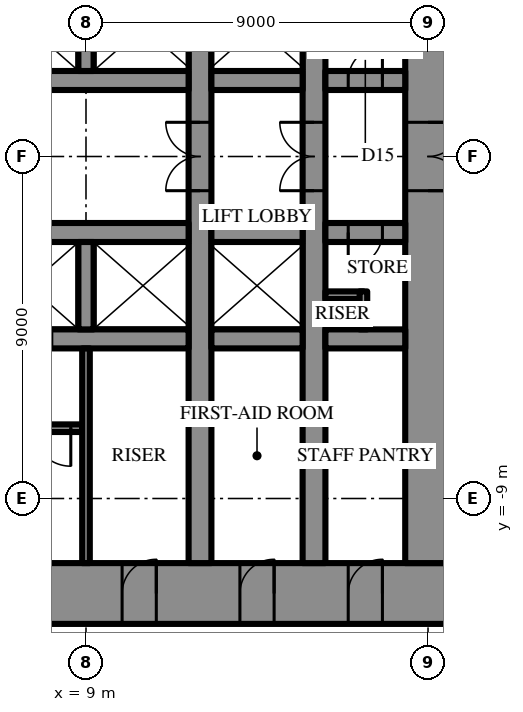
"""IFC4 building model, lengths in metres.
Left out: names, types, materials, properties, quantities, classifications, styles, units other than length and angle.
Written with IfcOpenShell. Run it as: python <this file> out.ifc"""

import sys

from ifc_helpers import new_model, si_unit, direction, frame, frame_2d, origin, place, context, subcontext, project, spatial, rectangle, extrude, element, fill, save


model = new_model("IFC4")
c1 = context("Model", 3, precision=1e-05, world=origin(), true_north=direction((0.0, 1.0)))
c2 = subcontext(c1, "Body", "Model", "MODEL_VIEW")
j1 = project(units=[si_unit("LENGTHUNIT", "METRE"), si_unit("PLANEANGLEUNIT", "RADIAN")], contexts=[c1])
p1 = place(None, origin())
s1 = spatial("IfcSite", under=j1, at=p1, CompositionType="ELEMENT")
p2 = place(p1, origin())
s2 = spatial("IfcBuilding", under=s1, at=p2, CompositionType="ELEMENT")
p3 = place(p2, frame((0.0, 0.0, 190.9)))
s3 = spatial("IfcBuildingStorey", under=s2, at=p3, CompositionType="ELEMENT", Elevation=190.9)
p4 = place(p3, frame((18.6, -11.5, 0.0), z_axis=(0.0, 0.0, 1.0), x_axis=(-1.0, 0.0, 0.0)))
e1 = element("IfcWall", 1, at=p4, inside=s3, PredefinedType="SHEAR", context=c2, shape_type="SweptSolid", body=[
    extrude(rectangle(XDim=37.2, YDim=1.6, at=frame_2d((18.6, 0.0))), origin(), (0.0, 0.0, 1.0), 4.2),
])
p5 = place(p4, frame((19.45, 0.0, 0.0)))
e2 = element("IfcOpeningElement", 2, at=p5, cuts=e1, PredefinedType="OPENING", context=c2, shape_type="SweptSolid", body=[
    extrude(rectangle(XDim=0.9, YDim=2.2, at=frame_2d((0.45, 1.1))), frame((0.0, 0.81, 0.0), z_axis=(0.0, -1.0, 0.0), x_axis=(1.0, 0.0, 0.0)), (0.0, 0.0, 1.0), 1.62),
])
p6 = place(p4, frame((22.45, 0.0, 0.0)))
e3 = element("IfcOpeningElement", 3, at=p6, cuts=e1, PredefinedType="OPENING", context=c2, shape_type="SweptSolid", body=[
    extrude(rectangle(XDim=0.9, YDim=2.2, at=frame_2d((0.45, 1.1))), frame((0.0, 0.81, 0.0), z_axis=(0.0, -1.0, 0.0), x_axis=(1.0, 0.0, 0.0)), (0.0, 0.0, 1.0), 1.62),
])
p7 = place(p4, frame((25.5, 0.0, 0.0)))
e4 = element("IfcOpeningElement", 4, at=p7, cuts=e1, PredefinedType="OPENING", context=c2, shape_type="SweptSolid", body=[
    extrude(rectangle(XDim=1.0, YDim=2.2, at=frame_2d((0.5, 1.1))), frame((0.0, 0.81, 0.0), z_axis=(0.0, -1.0, 0.0), x_axis=(1.0, 0.0, 0.0)), (0.0, 0.0, 1.0), 1.62),
])
p8 = place(p4, frame((1.8, 0.0, 0.0)))
e5 = element("IfcOpeningElement", 5, at=p8, cuts=e1, PredefinedType="OPENING", context=c2, shape_type="SweptSolid", body=[
    extrude(rectangle(XDim=0.9, YDim=2.2, at=frame_2d((0.45, 1.1))), frame((0.0, 0.81, 0.0), z_axis=(0.0, -1.0, 0.0), x_axis=(1.0, 0.0, 0.0)), (0.0, 0.0, 1.0), 1.62),
])
p9 = place(p4, frame((4.65, 0.0, 0.0)))
e6 = element("IfcOpeningElement", 6, at=p9, cuts=e1, PredefinedType="OPENING", context=c2, shape_type="SweptSolid", body=[
    extrude(rectangle(XDim=0.9, YDim=2.2, at=frame_2d((0.45, 1.1))), frame((0.0, 0.81, 0.0), z_axis=(0.0, -1.0, 0.0), x_axis=(1.0, 0.0, 0.0)), (0.0, 0.0, 1.0), 1.62),
])
p10 = place(p4, frame((7.75, 0.0, 0.0)))
e7 = element("IfcOpeningElement", 7, at=p10, cuts=e1, PredefinedType="OPENING", context=c2, shape_type="SweptSolid", body=[
    extrude(rectangle(XDim=0.9, YDim=2.2, at=frame_2d((0.45, 1.1))), frame((0.0, 0.81, 0.0), z_axis=(0.0, -1.0, 0.0), x_axis=(1.0, 0.0, 0.0)), (0.0, 0.0, 1.0), 1.62),
])
p11 = place(p4, frame((28.55, 0.0, 0.0)))
e8 = element("IfcOpeningElement", 8, at=p11, cuts=e1, PredefinedType="OPENING", context=c2, shape_type="SweptSolid", body=[
    extrude(rectangle(XDim=0.9, YDim=2.2, at=frame_2d((0.45, 1.1))), frame((0.0, 0.81, 0.0), z_axis=(0.0, -1.0, 0.0), x_axis=(1.0, 0.0, 0.0)), (0.0, 0.0, 1.0), 1.62),
])
p12 = place(p4, frame((31.65, 0.0, 0.0)))
e9 = element("IfcOpeningElement", 9, at=p12, cuts=e1, PredefinedType="OPENING", context=c2, shape_type="SweptSolid", body=[
    extrude(rectangle(XDim=0.9, YDim=2.2, at=frame_2d((0.45, 1.1))), frame((0.0, 0.81, 0.0), z_axis=(0.0, -1.0, 0.0), x_axis=(1.0, 0.0, 0.0)), (0.0, 0.0, 1.0), 1.62),
])
p13 = place(p4, frame((34.5, 0.0, 0.0)))
e10 = element("IfcOpeningElement", 10, at=p13, cuts=e1, PredefinedType="OPENING", context=c2, shape_type="SweptSolid", body=[
    extrude(rectangle(XDim=0.9, YDim=2.2, at=frame_2d((0.45, 1.1))), frame((0.0, 0.81, 0.0), z_axis=(0.0, -1.0, 0.0), x_axis=(1.0, 0.0, 0.0)), (0.0, 0.0, 1.0), 1.62),
])
p14 = place(p3, frame((18.0, -10.7, 0.0), z_axis=(0.0, 0.0, 1.0), x_axis=(0.0, 1.0, 0.0)))
e11 = element("IfcWall", 11, at=p14, inside=s3, PredefinedType="SHEAR", context=c2, shape_type="SweptSolid", body=[
    extrude(rectangle(XDim=21.4, YDim=1.2, at=frame_2d((10.7, 0.0))), origin(), (0.0, 0.0, 1.0), 4.2),
])
p15 = place(p14, frame((9.8, 0.0, 0.0)))
e12 = element("IfcOpeningElement", 12, at=p15, cuts=e11, PredefinedType="OPENING", context=c2, shape_type="SweptSolid", body=[
    extrude(rectangle(XDim=1.8, YDim=2.4, at=frame_2d((0.9, 1.2))), frame((0.0, 0.61, 0.0), z_axis=(0.0, -1.0, 0.0), x_axis=(1.0, 0.0, 0.0)), (0.0, 0.0, 1.0), 1.22),
])
p16 = place(p3, frame((12.0, -10.7, 0.0), z_axis=(0.0, 0.0, 1.0), x_axis=(0.0, 1.0, 0.0)))
e13 = element("IfcWall", 13, at=p16, inside=s3, PredefinedType="SHEAR", context=c2, shape_type="SweptSolid", body=[
    extrude(rectangle(XDim=21.4, YDim=0.6, at=frame_2d((10.7, 0.0))), origin(), (0.0, 0.0, 1.0), 4.2),
])
p17 = place(p16, frame((9.8, 0.0, 0.0)))
e14 = element("IfcOpeningElement", 14, at=p17, cuts=e13, PredefinedType="OPENING", context=c2, shape_type="SweptSolid", body=[
    extrude(rectangle(XDim=1.8, YDim=2.4, at=frame_2d((0.9, 1.2))), frame((0.0, 0.31, 0.0), z_axis=(0.0, -1.0, 0.0), x_axis=(1.0, 0.0, 0.0)), (0.0, 0.0, 1.0), 0.62),
])
p18 = place(p3, frame((15.0, -10.7, 0.0), z_axis=(0.0, 0.0, 1.0), x_axis=(0.0, 1.0, 0.0)))
e15 = element("IfcWall", 15, at=p18, inside=s3, PredefinedType="SHEAR", context=c2, shape_type="SweptSolid", body=[
    extrude(rectangle(XDim=21.4, YDim=0.6, at=frame_2d((10.7, 0.0))), origin(), (0.0, 0.0, 1.0), 4.2),
])
p19 = place(p18, frame((9.8, 0.0, 0.0)))
e16 = element("IfcOpeningElement", 16, at=p19, cuts=e15, PredefinedType="OPENING", context=c2, shape_type="SweptSolid", body=[
    extrude(rectangle(XDim=1.8, YDim=2.4, at=frame_2d((0.9, 1.2))), frame((0.0, 0.31, 0.0), z_axis=(0.0, -1.0, 0.0), x_axis=(1.0, 0.0, 0.0)), (0.0, 0.0, 1.0), 0.62),
])
p20 = place(p3, frame((-3.2, 2.0, 0.0), z_axis=(0.0, 0.0, 1.0), x_axis=(1.0, 0.0, 0.0)))
e17 = element("IfcWall", 17, at=p20, inside=s3, PredefinedType="SHEAR", context=c2, shape_type="SweptSolid", body=[
    extrude(rectangle(XDim=14.9, YDim=0.5, at=frame_2d((7.45, 0.0))), origin(), (0.0, 0.0, 1.0), 4.2),
])
p21 = place(p20, frame((1.15, 0.0, 0.0)))
e18 = element("IfcOpeningElement", 18, at=p21, cuts=e17, PredefinedType="OPENING", context=c2, shape_type="SweptSolid", body=[
    extrude(rectangle(XDim=1.1, YDim=2.2, at=frame_2d((0.55, 1.1))), frame((0.0, 0.26, 0.0), z_axis=(0.0, -1.0, 0.0), x_axis=(1.0, 0.0, 0.0)), (0.0, 0.0, 1.0), 0.52),
])
p22 = place(p20, frame((4.15, 0.0, 0.0)))
e19 = element("IfcOpeningElement", 19, at=p22, cuts=e17, PredefinedType="OPENING", context=c2, shape_type="SweptSolid", body=[
    extrude(rectangle(XDim=1.1, YDim=2.2, at=frame_2d((0.55, 1.1))), frame((0.0, 0.26, 0.0), z_axis=(0.0, -1.0, 0.0), x_axis=(1.0, 0.0, 0.0)), (0.0, 0.0, 1.0), 0.52),
])
p23 = place(p20, frame((7.15, 0.0, 0.0)))
e20 = element("IfcOpeningElement", 20, at=p23, cuts=e17, PredefinedType="OPENING", context=c2, shape_type="SweptSolid", body=[
    extrude(rectangle(XDim=1.1, YDim=2.2, at=frame_2d((0.55, 1.1))), frame((0.0, 0.26, 0.0), z_axis=(0.0, -1.0, 0.0), x_axis=(1.0, 0.0, 0.0)), (0.0, 0.0, 1.0), 0.52),
])
p24 = place(p20, frame((10.15, 0.0, 0.0)))
e21 = element("IfcOpeningElement", 21, at=p24, cuts=e17, PredefinedType="OPENING", context=c2, shape_type="SweptSolid", body=[
    extrude(rectangle(XDim=1.1, YDim=2.2, at=frame_2d((0.55, 1.1))), frame((0.0, 0.26, 0.0), z_axis=(0.0, -1.0, 0.0), x_axis=(1.0, 0.0, 0.0)), (0.0, 0.0, 1.0), 0.52),
])
p25 = place(p3, frame((12.3, 2.0, 0.0), z_axis=(0.0, 0.0, 1.0), x_axis=(1.0, 0.0, 0.0)))
e22 = element("IfcWall", 22, at=p25, inside=s3, PredefinedType="SHEAR", context=c2, shape_type="SweptSolid", body=[
    extrude(rectangle(XDim=2.4, YDim=0.5, at=frame_2d((1.2, 0.0))), origin(), (0.0, 0.0, 1.0), 4.2),
])
p26 = place(p3, frame((15.3, 2.0, 0.0), z_axis=(0.0, 0.0, 1.0), x_axis=(1.0, 0.0, 0.0)))
e23 = element("IfcWall", 23, at=p26, inside=s3, PredefinedType="SHEAR", context=c2, shape_type="SweptSolid", body=[
    extrude(rectangle(XDim=2.1, YDim=0.5, at=frame_2d((1.05, 0.0))), origin(), (0.0, 0.0, 1.0), 4.2),
])
p27 = place(p26, frame((0.6, 0.0, 0.0)))
e24 = element("IfcOpeningElement", 24, at=p27, cuts=e23, PredefinedType="OPENING", context=c2, shape_type="SweptSolid", body=[
    extrude(rectangle(XDim=0.9, YDim=2.2, at=frame_2d((0.45, 1.1))), frame((0.0, 0.26, 0.0), z_axis=(0.0, -1.0, 0.0), x_axis=(1.0, 0.0, 0.0)), (0.0, 0.0, 1.0), 0.52),
])
p28 = place(p3, frame((9.0, 2.25, 0.0), z_axis=(0.0, 0.0, 1.0), x_axis=(0.0, 1.0, 0.0)))
e25 = element("IfcWall", 25, at=p28, inside=s3, PredefinedType="SHEAR", context=c2, shape_type="SweptSolid", body=[
    extrude(rectangle(XDim=2.3, YDim=0.4, at=frame_2d((1.15, 0.0))), origin(), (0.0, 0.0, 1.0), 4.2),
])
p29 = place(p3, frame((17.4, -2.0, 0.0), z_axis=(0.0, 0.0, 1.0), x_axis=(-1.0, 0.0, 0.0)))
e26 = element("IfcWall", 26, at=p29, inside=s3, PredefinedType="SHEAR", context=c2, shape_type="SweptSolid", body=[
    extrude(rectangle(XDim=2.1, YDim=0.5, at=frame_2d((1.05, 0.0))), origin(), (0.0, 0.0, 1.0), 4.2),
])
p30 = place(p29, frame((0.6, 0.0, 0.0)))
e27 = element("IfcOpeningElement", 27, at=p30, cuts=e26, PredefinedType="OPENING", context=c2, shape_type="SweptSolid", body=[
    extrude(rectangle(XDim=0.9, YDim=2.2, at=frame_2d((0.45, 1.1))), frame((0.0, 0.26, 0.0), z_axis=(0.0, -1.0, 0.0), x_axis=(1.0, 0.0, 0.0)), (0.0, 0.0, 1.0), 0.52),
])
p31 = place(p3, frame((14.7, -2.0, 0.0), z_axis=(0.0, 0.0, 1.0), x_axis=(-1.0, 0.0, 0.0)))
e28 = element("IfcWall", 28, at=p31, inside=s3, PredefinedType="SHEAR", context=c2, shape_type="SweptSolid", body=[
    extrude(rectangle(XDim=2.4, YDim=0.5, at=frame_2d((1.2, 0.0))), origin(), (0.0, 0.0, 1.0), 4.2),
])
p32 = place(p3, frame((11.7, -2.0, 0.0), z_axis=(0.0, 0.0, 1.0), x_axis=(-1.0, 0.0, 0.0)))
e29 = element("IfcWall", 29, at=p32, inside=s3, PredefinedType="SHEAR", context=c2, shape_type="SweptSolid", body=[
    extrude(rectangle(XDim=5.9, YDim=0.5, at=frame_2d((2.95, 0.0))), origin(), (0.0, 0.0, 1.0), 4.2),
])
p33 = place(p3, frame((17.4, -4.8, 0.0), z_axis=(0.0, 0.0, 1.0), x_axis=(-1.0, 0.0, 0.0)))
e30 = element("IfcWall", 30, at=p33, inside=s3, PredefinedType="SHEAR", context=c2, shape_type="SweptSolid", body=[
    extrude(rectangle(XDim=2.1, YDim=0.5, at=frame_2d((1.05, 0.0))), origin(), (0.0, 0.0, 1.0), 4.2),
])
p34 = place(p3, frame((14.7, -4.8, 0.0), z_axis=(0.0, 0.0, 1.0), x_axis=(-1.0, 0.0, 0.0)))
e31 = element("IfcWall", 31, at=p34, inside=s3, PredefinedType="SHEAR", context=c2, shape_type="SweptSolid", body=[
    extrude(rectangle(XDim=2.4, YDim=0.5, at=frame_2d((1.2, 0.0))), origin(), (0.0, 0.0, 1.0), 4.2),
])
p35 = place(p3, frame((11.7, -4.8, 0.0), z_axis=(0.0, 0.0, 1.0), x_axis=(-1.0, 0.0, 0.0)))
e32 = element("IfcWall", 32, at=p35, inside=s3, PredefinedType="SHEAR", context=c2, shape_type="SweptSolid", body=[
    extrude(rectangle(XDim=23.4, YDim=0.5, at=frame_2d((11.7, 0.0))), origin(), (0.0, 0.0, 1.0), 4.2),
])
p36 = place(p35, frame((6.6, 0.0, 0.0)))
e33 = element("IfcOpeningElement", 33, at=p36, cuts=e32, PredefinedType="OPENING", context=c2, shape_type="SweptSolid", body=[
    extrude(rectangle(XDim=1.2, YDim=2.2, at=frame_2d((0.6, 1.1))), frame((0.0, 0.26, 0.0), z_axis=(0.0, -1.0, 0.0), x_axis=(1.0, 0.0, 0.0)), (0.0, 0.0, 1.0), 0.52),
])
p37 = place(p35, frame((3.6, 0.0, 0.0)))
e34 = element("IfcOpeningElement", 34, at=p37, cuts=e32, PredefinedType="OPENING", context=c2, shape_type="SweptSolid", body=[
    extrude(rectangle(XDim=1.2, YDim=2.2, at=frame_2d((0.6, 1.1))), frame((0.0, 0.26, 0.0), z_axis=(0.0, -1.0, 0.0), x_axis=(1.0, 0.0, 0.0)), (0.0, 0.0, 1.0), 0.52),
])
p38 = place(p3, frame((9.0, -2.25, 0.0), z_axis=(0.0, 0.0, 1.0), x_axis=(0.0, -1.0, 0.0)))
e35 = element("IfcWall", 35, at=p38, inside=s3, PredefinedType="SHEAR", context=c2, shape_type="SweptSolid", body=[
    extrude(rectangle(XDim=2.3, YDim=0.4, at=frame_2d((1.15, 0.0))), origin(), (0.0, 0.0, 1.0), 4.2),
])
p39 = place(p3, frame((8.9, -7.15, 0.0), z_axis=(0.0, 0.0, 1.0), x_axis=(-1.0, 0.0, 0.0)))
e36 = element("IfcWall", 36, at=p39, inside=s3, PredefinedType="SHEAR", context=c2, shape_type="SweptSolid", body=[
    extrude(rectangle(XDim=8.6, YDim=0.2, at=frame_2d((4.3, 0.0))), origin(), (0.0, 0.0, 1.0), 4.2),
])
p40 = place(p39, frame((0.3, 0.0, 0.0)))
e37 = element("IfcOpeningElement", 37, at=p40, cuts=e36, PredefinedType="OPENING", context=c2, shape_type="SweptSolid", body=[
    extrude(rectangle(XDim=1.0, YDim=2.2, at=frame_2d((0.5, 1.1))), frame((0.0, 0.11, 0.0), z_axis=(0.0, -1.0, 0.0), x_axis=(1.0, 0.0, 0.0)), (0.0, 0.0, 1.0), 0.22),
])
p41 = place(p3, frame((9.0, -5.05, 0.0), z_axis=(0.0, 0.0, 1.0), x_axis=(0.0, -1.0, 0.0)))
e38 = element("IfcWall", 38, at=p41, inside=s3, PredefinedType="PARTITIONING", context=c2, shape_type="SweptSolid", body=[
    extrude(rectangle(XDim=5.65, YDim=0.2, at=frame_2d((2.825, 0.0))), origin(), (0.0, 0.0, 1.0), 4.0),
])
for number, where, z_axis, x_axis in (
    (39, (16.3, -3.65, 0.0), (0.0, 0.0, 1.0), (-1.0, 0.0, 0.0)),
    (40, (16.3, -3.55, 0.0), (0.0, 0.0, 1.0), (0.0, -1.0, 0.0)),
):
    element("IfcWall", number, at=place(p3, frame(where, z_axis=z_axis, x_axis=x_axis)), inside=s3, PredefinedType="PARTITIONING", context=c2, shape_type="SweptSolid", body=[
        extrude(rectangle(XDim=1.0, YDim=0.2, at=frame_2d((0.5, 0.0))), origin(), (0.0, 0.0, 1.0), 4.0),
    ])
p42 = place(p3, frame((15.298, -20.503, 0.0), z_axis=(0.0, 0.0, 1.0), x_axis=(0.500010972563, 0.86601906868, 0.0)))
e41 = element("IfcWall", 41, at=p42, inside=s3, PredefinedType="PARTITIONING", context=c2, shape_type="SweptSolid", body=[
    extrude(rectangle(XDim=15.211, YDim=0.2, at=frame_2d((7.605, 0.0))), origin(), (0.0, 0.0, 1.0), 4.0),
])
p43 = place(p42, frame((2.102, 0.0, 0.0)))
e42 = element("IfcOpeningElement", 42, at=p43, cuts=e41, PredefinedType="OPENING", context=c2, shape_type="SweptSolid", body=[
    extrude(rectangle(XDim=1.0, YDim=2.2, at=frame_2d((0.5, 1.1))), frame((0.0, 0.11, 0.0), z_axis=(0.0, -1.0, 0.0), x_axis=(1.0, 0.0, 0.0)), (0.0, 0.0, 1.0), 0.22),
])
p44 = place(p15, frame((1.8, 0.0, 0.0), z_axis=(0.0, 0.0, 1.0), x_axis=(-1.0, 0.0, 0.0)))
e43 = element("IfcDoor", 43, at=p44, inside=s3, OperationType="DOUBLE_DOOR_SINGLE_SWING", PredefinedType="DOOR", context=c2, shape_type="SweptSolid", body=[
    extrude(rectangle(XDim=1.8, YDim=2.4, at=frame_2d((0.9, 1.2))), frame((0.0, 0.025, 0.0), z_axis=(0.0, -1.0, 0.0), x_axis=(1.0, 0.0, 0.0)), (0.0, 0.0, 1.0), 0.05),
])
fill(e12, e43)
p45 = place(p40, origin())
e44 = element("IfcDoor", 44, at=p45, inside=s3, OperationType="SINGLE_SWING_RIGHT", PredefinedType="DOOR", context=c2, shape_type="SweptSolid", body=[
    extrude(rectangle(XDim=1.0, YDim=2.2, at=frame_2d((0.5, 1.1))), frame((0.0, 0.025, 0.0), z_axis=(0.0, -1.0, 0.0), x_axis=(1.0, 0.0, 0.0)), (0.0, 0.0, 1.0), 0.05),
])
fill(e37, e44)
p46 = place(p8, frame((0.9, 0.0, 0.0), z_axis=(0.0, 0.0, 1.0), x_axis=(-1.0, 0.0, 0.0)))
e45 = element("IfcDoor", 45, at=p46, inside=s3, OperationType="SINGLE_SWING_LEFT", PredefinedType="DOOR", context=c2, shape_type="SweptSolid", body=[
    extrude(rectangle(XDim=0.9, YDim=2.2, at=frame_2d((0.45, 1.1))), frame((0.0, 0.025, 0.0), z_axis=(0.0, -1.0, 0.0), x_axis=(1.0, 0.0, 0.0)), (0.0, 0.0, 1.0), 0.05),
])
fill(e5, e45)
p47 = place(p9, frame((0.9, 0.0, 0.0), z_axis=(0.0, 0.0, 1.0), x_axis=(-1.0, 0.0, 0.0)))
e46 = element("IfcDoor", 46, at=p47, inside=s3, OperationType="SINGLE_SWING_LEFT", PredefinedType="DOOR", context=c2, shape_type="SweptSolid", body=[
    extrude(rectangle(XDim=0.9, YDim=2.2, at=frame_2d((0.45, 1.1))), frame((0.0, 0.025, 0.0), z_axis=(0.0, -1.0, 0.0), x_axis=(1.0, 0.0, 0.0)), (0.0, 0.0, 1.0), 0.05),
])
fill(e6, e46)
p48 = place(p10, frame((0.9, 0.0, 0.0), z_axis=(0.0, 0.0, 1.0), x_axis=(-1.0, 0.0, 0.0)))
e47 = element("IfcDoor", 47, at=p48, inside=s3, OperationType="SINGLE_SWING_LEFT", PredefinedType="DOOR", context=c2, shape_type="SweptSolid", body=[
    extrude(rectangle(XDim=0.9, YDim=2.2, at=frame_2d((0.45, 1.1))), frame((0.0, 0.025, 0.0), z_axis=(0.0, -1.0, 0.0), x_axis=(1.0, 0.0, 0.0)), (0.0, 0.0, 1.0), 0.05),
])
fill(e7, e47)
p49 = place(p27, origin())
e48 = element("IfcDoor", 48, at=p49, inside=s3, OperationType="SINGLE_SWING_LEFT", PredefinedType="DOOR", context=c2, shape_type="SweptSolid", body=[
    extrude(rectangle(XDim=0.9, YDim=2.2, at=frame_2d((0.45, 1.1))), frame((0.0, 0.025, 0.0), z_axis=(0.0, -1.0, 0.0), x_axis=(1.0, 0.0, 0.0)), (0.0, 0.0, 1.0), 0.05),
])
fill(e24, e48)
p50 = place(p30, origin())
e49 = element("IfcDoor", 49, at=p50, inside=s3, OperationType="SINGLE_SWING_LEFT", PredefinedType="DOOR", context=c2, shape_type="SweptSolid", body=[
    extrude(rectangle(XDim=0.9, YDim=2.2, at=frame_2d((0.45, 1.1))), frame((0.0, 0.025, 0.0), z_axis=(0.0, -1.0, 0.0), x_axis=(1.0, 0.0, 0.0)), (0.0, 0.0, 1.0), 0.05),
])
fill(e27, e49)
p51 = place(p17, origin())
e50 = element("IfcDoor", 50, at=p51, inside=s3, OperationType="DOUBLE_DOOR_SINGLE_SWING", PredefinedType="DOOR", context=c2, shape_type="SweptSolid", body=[
    extrude(rectangle(XDim=1.8, YDim=2.4, at=frame_2d((0.9, 1.2))), frame((0.0, 0.025, 0.0), z_axis=(0.0, -1.0, 0.0), x_axis=(1.0, 0.0, 0.0)), (0.0, 0.0, 1.0), 0.05),
])
fill(e14, e50)
p52 = place(p19, origin())
e51 = element("IfcDoor", 51, at=p52, inside=s3, OperationType="DOUBLE_DOOR_SINGLE_SWING", PredefinedType="DOOR", context=c2, shape_type="SweptSolid", body=[
    extrude(rectangle(XDim=1.8, YDim=2.4, at=frame_2d((0.9, 1.2))), frame((0.0, 0.025, 0.0), z_axis=(0.0, -1.0, 0.0), x_axis=(1.0, 0.0, 0.0)), (0.0, 0.0, 1.0), 0.05),
])
fill(e16, e51)
save(model, sys.argv[1])
